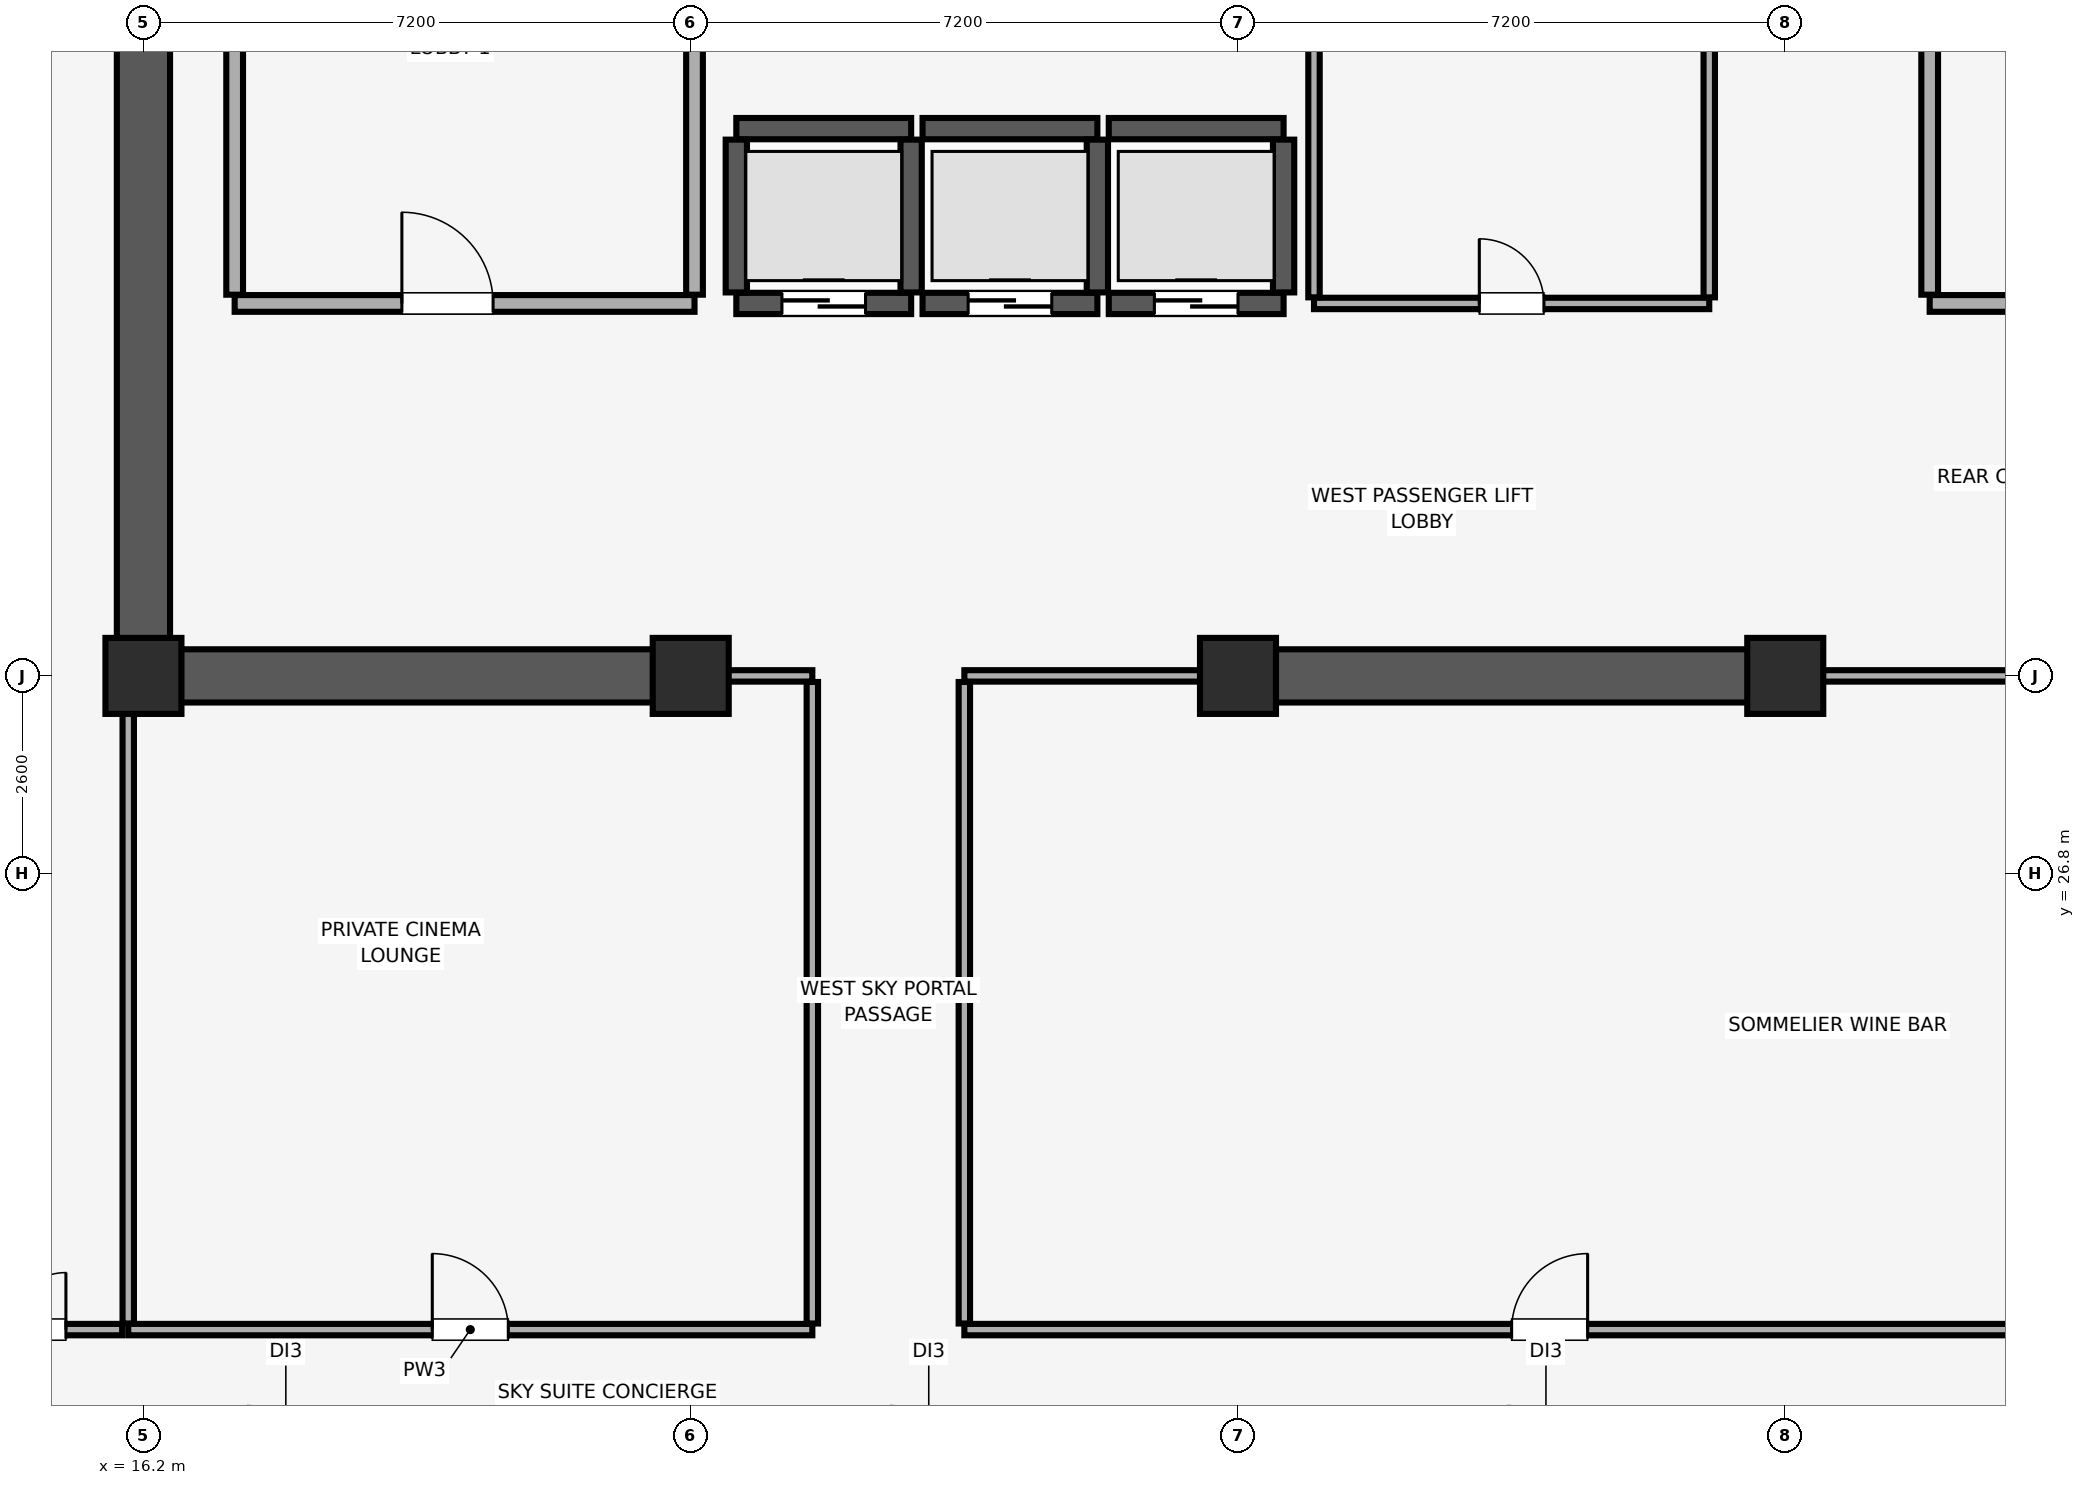
"""IFC4 building model, lengths in metres.
Left out: names, types, materials, properties, quantities, classifications, styles, units other than length and angle.
Written with IfcOpenShell. Run it as: python <this file> out.ifc"""

import sys

from ifc_helpers import new_model, si_unit, direction, frame, frame_2d, origin, origin_2d, place, context, subcontext, project, spatial, rectangle, extrude, element, fill, save


model = new_model("IFC4")
c1 = context("Model", 3, precision=1e-05, world=origin(), true_north=direction((0.0, 1.0)))
c2 = subcontext(c1, "Body", "Model", "MODEL_VIEW")
j1 = project(units=[si_unit("LENGTHUNIT", "METRE"), si_unit("PLANEANGLEUNIT", "RADIAN")], contexts=[c1])
p1 = place(None, origin())
s1 = spatial("IfcSite", under=j1, at=p1, CompositionType="ELEMENT")
p2 = place(p1, origin())
s2 = spatial("IfcBuilding", under=s1, at=p2, CompositionType="ELEMENT")
p3 = place(p2, frame((0.0, 0.0, 285.9)))
s3 = spatial("IfcBuildingStorey", under=s2, at=p3, CompositionType="ELEMENT", Elevation=285.9)
for number, where, z_axis, x_axis in (
    (1, (16.2, 29.4, 0.0), (0.0, 0.0, 1.0), (1.0, 0.0, 0.0)),
    (2, (23.4, 29.4, 0.0), (0.0, 0.0, 1.0), (1.0, 0.0, 0.0)),
    (3, (30.6, 29.4, 0.0), (0.0, 0.0, 1.0), (1.0, 0.0, 0.0)),
    (4, (37.8, 29.4, 0.0), (0.0, 0.0, 1.0), (1.0, 0.0, 0.0)),
):
    element("IfcColumn", number, at=place(p3, frame(where, z_axis=z_axis, x_axis=x_axis)), inside=s3, PredefinedType="COLUMN", context=c2, shape_type="SweptSolid", body=[
        extrude(rectangle(XDim=1.0, YDim=1.0, at=origin_2d()), origin(), (0.0, 0.0, 1.0), 4.1),
    ])
p4 = place(p3, frame((16.2, 29.4, 0.0), z_axis=(0.0, 0.0, 1.0), x_axis=(0.0, 1.0, 0.0)))
e5 = element("IfcWall", 5, at=p4, inside=s3, PredefinedType="SHEAR", context=c2, shape_type="SweptSolid", body=[
    extrude(rectangle(XDim=19.2, YDim=0.7, at=frame_2d((9.6, 0.0))), origin(), (0.0, 0.0, 1.0), 4.1),
])
p5 = place(p3, frame((16.555, 29.4, 0.0), z_axis=(0.0, 0.0, 1.0), x_axis=(1.0, 0.0, 0.0)))
e6 = element("IfcWall", 6, at=p5, inside=s3, PredefinedType="SHEAR", context=c2, shape_type="SweptSolid", body=[
    extrude(rectangle(XDim=7.045, YDim=0.7, at=frame_2d((3.522, 0.0))), origin(), (0.0, 0.0, 1.0), 4.1),
])
p6 = place(p3, frame((30.4, 29.4, 0.0), z_axis=(0.0, 0.0, 1.0), x_axis=(1.0, 0.0, 0.0)))
e7 = element("IfcWall", 7, at=p6, inside=s3, PredefinedType="SHEAR", context=c2, shape_type="SweptSolid", body=[
    extrude(rectangle(XDim=7.6, YDim=0.7, at=frame_2d((3.8, 0.0))), origin(), (0.0, 0.0, 1.0), 4.1),
])
p7 = place(p3, frame((24.0, 34.3, 0.0), z_axis=(0.0, 0.0, 1.0), x_axis=(1.0, 0.0, 0.0)))
e8 = element("IfcWall", 8, at=p7, inside=s3, PredefinedType="SHEAR", context=c2, shape_type="SweptSolid", body=[
    extrude(rectangle(XDim=2.3, YDim=0.28, at=frame_2d((1.15, 0.0))), origin(), (0.0, 0.0, 1.0), 4.1),
])
p8 = place(p7, frame((0.6, 0.0, 0.0)))
e9 = element("IfcOpeningElement", 9, at=p8, cuts=e8, PredefinedType="OPENING", context=c2, shape_type="SweptSolid", body=[
    extrude(rectangle(XDim=1.1, YDim=2.2, at=frame_2d((0.55, 1.1))), frame((0.0, 0.15, 0.0), z_axis=(0.0, -1.0, 0.0), x_axis=(1.0, 0.0, 0.0)), (0.0, 0.0, 1.0), 0.3),
])
p9 = place(p3, frame((24.0, 36.6, 0.0), z_axis=(0.0, 0.0, 1.0), x_axis=(1.0, 0.0, 0.0)))
e10 = element("IfcWall", 10, at=p9, inside=s3, PredefinedType="SHEAR", context=c2, shape_type="SweptSolid", body=[
    extrude(rectangle(XDim=2.3, YDim=0.28, at=frame_2d((1.15, 0.0))), origin(), (0.0, 0.0, 1.0), 4.1),
])
for number, where, z_axis, x_axis in (
    (11, (24.0, 34.445, 0.0), (0.0, 0.0, 1.0), (0.0, 1.0, 0.0)),
    (12, (26.3, 34.445, 0.0), (0.0, 0.0, 1.0), (0.0, 1.0, 0.0)),
):
    element("IfcWall", number, at=place(p3, frame(where, z_axis=z_axis, x_axis=x_axis)), inside=s3, PredefinedType="SHEAR", context=c2, shape_type="SweptSolid", body=[
        extrude(rectangle(XDim=2.01, YDim=0.28, at=frame_2d((1.005, 0.0))), origin(), (0.0, 0.0, 1.0), 4.1),
    ])
p10 = place(p3, frame((26.45, 34.3, 0.0), z_axis=(0.0, 0.0, 1.0), x_axis=(1.0, 0.0, 0.0)))
e13 = element("IfcWall", 13, at=p10, inside=s3, PredefinedType="SHEAR", context=c2, shape_type="SweptSolid", body=[
    extrude(rectangle(XDim=2.3, YDim=0.28, at=frame_2d((1.15, 0.0))), origin(), (0.0, 0.0, 1.0), 4.1),
])
p11 = place(p10, frame((0.6, 0.0, 0.0)))
e14 = element("IfcOpeningElement", 14, at=p11, cuts=e13, PredefinedType="OPENING", context=c2, shape_type="SweptSolid", body=[
    extrude(rectangle(XDim=1.1, YDim=2.2, at=frame_2d((0.55, 1.1))), frame((0.0, 0.15, 0.0), z_axis=(0.0, -1.0, 0.0), x_axis=(1.0, 0.0, 0.0)), (0.0, 0.0, 1.0), 0.3),
])
p12 = place(p3, frame((26.45, 36.6, 0.0), z_axis=(0.0, 0.0, 1.0), x_axis=(1.0, 0.0, 0.0)))
e15 = element("IfcWall", 15, at=p12, inside=s3, PredefinedType="SHEAR", context=c2, shape_type="SweptSolid", body=[
    extrude(rectangle(XDim=2.3, YDim=0.28, at=frame_2d((1.15, 0.0))), origin(), (0.0, 0.0, 1.0), 4.1),
])
p13 = place(p3, frame((28.75, 34.445, 0.0), z_axis=(0.0, 0.0, 1.0), x_axis=(0.0, 1.0, 0.0)))
e16 = element("IfcWall", 16, at=p13, inside=s3, PredefinedType="SHEAR", context=c2, shape_type="SweptSolid", body=[
    extrude(rectangle(XDim=2.01, YDim=0.28, at=frame_2d((1.005, 0.0))), origin(), (0.0, 0.0, 1.0), 4.1),
])
p14 = place(p3, frame((28.9, 34.3, 0.0), z_axis=(0.0, 0.0, 1.0), x_axis=(1.0, 0.0, 0.0)))
e17 = element("IfcWall", 17, at=p14, inside=s3, PredefinedType="SHEAR", context=c2, shape_type="SweptSolid", body=[
    extrude(rectangle(XDim=2.3, YDim=0.28, at=frame_2d((1.15, 0.0))), origin(), (0.0, 0.0, 1.0), 4.1),
])
p15 = place(p14, frame((0.6, 0.0, 0.0)))
e18 = element("IfcOpeningElement", 18, at=p15, cuts=e17, PredefinedType="OPENING", context=c2, shape_type="SweptSolid", body=[
    extrude(rectangle(XDim=1.1, YDim=2.2, at=frame_2d((0.55, 1.1))), frame((0.0, 0.15, 0.0), z_axis=(0.0, -1.0, 0.0), x_axis=(1.0, 0.0, 0.0)), (0.0, 0.0, 1.0), 0.3),
])
p16 = place(p3, frame((28.9, 36.6, 0.0), z_axis=(0.0, 0.0, 1.0), x_axis=(1.0, 0.0, 0.0)))
e19 = element("IfcWall", 19, at=p16, inside=s3, PredefinedType="SHEAR", context=c2, shape_type="SweptSolid", body=[
    extrude(rectangle(XDim=2.3, YDim=0.28, at=frame_2d((1.15, 0.0))), origin(), (0.0, 0.0, 1.0), 4.1),
])
p17 = place(p3, frame((31.2, 34.445, 0.0), z_axis=(0.0, 0.0, 1.0), x_axis=(0.0, 1.0, 0.0)))
e20 = element("IfcWall", 20, at=p17, inside=s3, PredefinedType="SHEAR", context=c2, shape_type="SweptSolid", body=[
    extrude(rectangle(XDim=2.01, YDim=0.28, at=frame_2d((1.005, 0.0))), origin(), (0.0, 0.0, 1.0), 4.1),
])
p18 = place(p3, frame((17.4, 34.3, 0.0), z_axis=(0.0, 0.0, 1.0), x_axis=(1.0, 0.0, 0.0)))
e21 = element("IfcWall", 21, at=p18, inside=s3, PredefinedType="PARTITIONING", context=c2, shape_type="SweptSolid", body=[
    extrude(rectangle(XDim=6.05, YDim=0.22, at=frame_2d((3.025, 0.0))), origin(), (0.0, 0.0, 1.0), 4.1),
])
p19 = place(p18, frame((2.2, 0.0, 0.0)))
e22 = element("IfcOpeningElement", 22, at=p19, cuts=e21, PredefinedType="OPENING", context=c2, shape_type="SweptSolid", body=[
    extrude(rectangle(XDim=1.2, YDim=2.15, at=frame_2d((0.6, 1.075))), frame((0.0, 0.12, 0.0), z_axis=(0.0, -1.0, 0.0), x_axis=(1.0, 0.0, 0.0)), (0.0, 0.0, 1.0), 0.24),
])
p20 = place(p3, frame((17.4, 34.415, 0.0), z_axis=(0.0, 0.0, 1.0), x_axis=(0.0, 1.0, 0.0)))
e23 = element("IfcWall", 23, at=p20, inside=s3, PredefinedType="PARTITIONING", context=c2, shape_type="SweptSolid", body=[
    extrude(rectangle(XDim=5.43, YDim=0.22, at=frame_2d((2.715, 0.0))), origin(), (0.0, 0.0, 1.0), 4.1),
])
p21 = place(p3, frame((23.45, 34.415, 0.0), z_axis=(0.0, 0.0, 1.0), x_axis=(0.0, 1.0, 0.0)))
e24 = element("IfcWall", 24, at=p21, inside=s3, PredefinedType="PARTITIONING", context=c2, shape_type="SweptSolid", body=[
    extrude(rectangle(XDim=5.64, YDim=0.22, at=frame_2d((2.82, 0.0))), origin(), (0.0, 0.0, 1.0), 4.1),
])
p22 = place(p3, frame((39.7, 34.3, 0.0), z_axis=(0.0, 0.0, 1.0), x_axis=(1.0, 0.0, 0.0)))
e25 = element("IfcWall", 25, at=p22, inside=s3, PredefinedType="PARTITIONING", context=c2, shape_type="SweptSolid", body=[
    extrude(rectangle(XDim=4.6, YDim=0.22, at=frame_2d((2.3, 0.0))), origin(), (0.0, 0.0, 1.0), 4.1),
])
p23 = place(p22, frame((1.7, 0.0, 0.0)))
e26 = element("IfcOpeningElement", 26, at=p23, cuts=e25, PredefinedType="OPENING", context=c2, shape_type="SweptSolid", body=[
    extrude(rectangle(XDim=1.2, YDim=2.15, at=frame_2d((0.6, 1.075))), frame((0.0, 0.12, 0.0), z_axis=(0.0, -1.0, 0.0), x_axis=(1.0, 0.0, 0.0)), (0.0, 0.0, 1.0), 0.24),
])
p24 = place(p3, frame((39.7, 34.415, 0.0), z_axis=(0.0, 0.0, 1.0), x_axis=(0.0, 1.0, 0.0)))
e27 = element("IfcWall", 27, at=p24, inside=s3, PredefinedType="PARTITIONING", context=c2, shape_type="SweptSolid", body=[
    extrude(rectangle(XDim=5.785, YDim=0.22, at=frame_2d((2.893, 0.0))), origin(), (0.0, 0.0, 1.0), 4.1),
])
p25 = place(p3, frame((31.6, 34.3, 0.0), z_axis=(0.0, 0.0, 1.0), x_axis=(1.0, 0.0, 0.0)))
e28 = element("IfcWall", 28, at=p25, inside=s3, PredefinedType="PARTITIONING", context=c2, shape_type="SweptSolid", body=[
    extrude(rectangle(XDim=5.2, YDim=0.15, at=frame_2d((2.6, 0.0))), origin(), (0.0, 0.0, 1.0), 4.1),
])
p26 = place(p25, frame((2.175, 0.0, 0.0)))
e29 = element("IfcOpeningElement", 29, at=p26, cuts=e28, PredefinedType="OPENING", context=c2, shape_type="SweptSolid", body=[
    extrude(rectangle(XDim=0.85, YDim=2.1, at=frame_2d((0.425, 1.05))), frame((0.0, 0.085, 0.0), z_axis=(0.0, -1.0, 0.0), x_axis=(1.0, 0.0, 0.0)), (0.0, 0.0, 1.0), 0.17),
])
for number, where, z_axis, x_axis in (
    (30, (31.6, 34.38, 0.0), (0.0, 0.0, 1.0), (0.0, 1.0, 0.0)),
    (31, (36.8, 34.38, 0.0), (0.0, 0.0, 1.0), (0.0, 1.0, 0.0)),
):
    element("IfcWall", number, at=place(p3, frame(where, z_axis=z_axis, x_axis=x_axis)), inside=s3, PredefinedType="PARTITIONING", context=c2, shape_type="SweptSolid", body=[
        extrude(rectangle(XDim=4.94, YDim=0.15, at=frame_2d((2.47, 0.0))), origin(), (0.0, 0.0, 1.0), 4.1),
    ])
p27 = place(p3, frame((16.0, 20.8, 0.0), z_axis=(0.0, 0.0, 1.0), x_axis=(1.0, 0.0, 0.0)))
e32 = element("IfcWall", 32, at=p27, inside=s3, PredefinedType="PARTITIONING", context=c2, shape_type="SweptSolid", body=[
    extrude(rectangle(XDim=9.0, YDim=0.15, at=frame_2d((4.5, 0.0))), origin(), (0.0, 0.0, 1.0), 4.1),
])
p28 = place(p27, frame((4.0, 0.0, 0.0)))
e33 = element("IfcOpeningElement", 33, at=p28, cuts=e32, PredefinedType="OPENING", context=c2, shape_type="SweptSolid", body=[
    extrude(rectangle(XDim=1.0, YDim=2.15, at=frame_2d((0.5, 1.075))), frame((0.0, 0.085, 0.0), z_axis=(0.0, -1.0, 0.0), x_axis=(1.0, 0.0, 0.0)), (0.0, 0.0, 1.0), 0.17),
])
p29 = place(p3, frame((23.61, 29.4, 0.0), z_axis=(0.0, 0.0, 1.0), x_axis=(1.0, 0.0, 0.0)))
e34 = element("IfcWall", 34, at=p29, inside=s3, PredefinedType="PARTITIONING", context=c2, shape_type="SweptSolid", body=[
    extrude(rectangle(XDim=1.39, YDim=0.15, at=frame_2d((0.695, 0.0))), origin(), (0.0, 0.0, 1.0), 3.0),
])
p30 = place(p3, frame((16.0, 20.88, 0.0), z_axis=(0.0, 0.0, 1.0), x_axis=(0.0, 1.0, 0.0)))
e35 = element("IfcWall", 35, at=p30, inside=s3, PredefinedType="PARTITIONING", context=c2, shape_type="SweptSolid", body=[
    extrude(rectangle(XDim=8.51, YDim=0.15, at=frame_2d((4.255, 0.0))), origin(), (0.0, 0.0, 1.0), 3.74),
])
p31 = place(p3, frame((25.0, 20.88, 0.0), z_axis=(0.0, 0.0, 1.0), x_axis=(0.0, 1.0, 0.0)))
e36 = element("IfcWall", 36, at=p31, inside=s3, PredefinedType="PARTITIONING", context=c2, shape_type="SweptSolid", body=[
    extrude(rectangle(XDim=8.44, YDim=0.15, at=frame_2d((4.22, 0.0))), origin(), (0.0, 0.0, 1.0), 4.1),
])
p32 = place(p3, frame((27.0, 20.8, 0.0), z_axis=(0.0, 0.0, 1.0), x_axis=(1.0, 0.0, 0.0)))
e37 = element("IfcWall", 37, at=p32, inside=s3, PredefinedType="PARTITIONING", context=c2, shape_type="SweptSolid", body=[
    extrude(rectangle(XDim=15.4, YDim=0.15, at=frame_2d((7.7, 0.0))), origin(), (0.0, 0.0, 1.0), 4.1),
])
p33 = place(p32, frame((7.2, 0.0, 0.0)))
e38 = element("IfcOpeningElement", 38, at=p33, cuts=e37, PredefinedType="OPENING", context=c2, shape_type="SweptSolid", body=[
    extrude(rectangle(XDim=1.0, YDim=2.15, at=frame_2d((0.5, 1.075))), frame((0.0, 0.085, 0.0), z_axis=(0.0, -1.0, 0.0), x_axis=(1.0, 0.0, 0.0)), (0.0, 0.0, 1.0), 0.17),
])
p34 = place(p3, frame((27.0, 29.4, 0.0), z_axis=(0.0, 0.0, 1.0), x_axis=(1.0, 0.0, 0.0)))
e39 = element("IfcWall", 39, at=p34, inside=s3, PredefinedType="PARTITIONING", context=c2, shape_type="SweptSolid", body=[
    extrude(rectangle(XDim=3.39, YDim=0.15, at=frame_2d((1.695, 0.0))), origin(), (0.0, 0.0, 1.0), 3.0),
])
p35 = place(p3, frame((38.01, 29.4, 0.0), z_axis=(0.0, 0.0, 1.0), x_axis=(1.0, 0.0, 0.0)))
e40 = element("IfcWall", 40, at=p35, inside=s3, PredefinedType="PARTITIONING", context=c2, shape_type="SweptSolid", body=[
    extrude(rectangle(XDim=4.39, YDim=0.15, at=frame_2d((2.195, 0.0))), origin(), (0.0, 0.0, 1.0), 3.0),
])
p36 = place(p3, frame((27.0, 20.88, 0.0), z_axis=(0.0, 0.0, 1.0), x_axis=(0.0, 1.0, 0.0)))
e41 = element("IfcWall", 41, at=p36, inside=s3, PredefinedType="PARTITIONING", context=c2, shape_type="SweptSolid", body=[
    extrude(rectangle(XDim=8.44, YDim=0.15, at=frame_2d((4.22, 0.0))), origin(), (0.0, 0.0, 1.0), 3.74),
])
p37 = place(p3, frame((9.15, 20.8, 0.0), z_axis=(0.0, 0.0, 1.0), x_axis=(1.0, 0.0, 0.0)))
e42 = element("IfcWall", 42, at=p37, inside=s3, PredefinedType="PARTITIONING", context=c2, shape_type="SweptSolid", body=[
    extrude(rectangle(XDim=6.77, YDim=0.15, at=frame_2d((3.385, 0.0))), origin(), (0.0, 0.0, 1.0), 4.1),
])
p38 = place(p37, frame((4.53, 0.0, 0.0)))
e43 = element("IfcOpeningElement", 43, at=p38, cuts=e42, PredefinedType="OPENING", context=c2, shape_type="SweptSolid", body=[
    extrude(rectangle(XDim=1.5, YDim=2.25, at=frame_2d((0.75, 1.125))), frame((0.0, 0.085, 0.0), z_axis=(0.0, -1.0, 0.0), x_axis=(1.0, 0.0, 0.0)), (0.0, 0.0, 1.0), 0.17),
])
p39 = place(p8, origin())
e44 = element("IfcDoor", 44, at=p39, inside=s3, OperationType="DOUBLE_DOOR_SLIDING", PredefinedType="DOOR", context=c2, shape_type="SweptSolid", body=[
    extrude(rectangle(XDim=1.1, YDim=2.2, at=frame_2d((0.55, 1.1))), frame((0.0, 0.025, 0.0), z_axis=(0.0, -1.0, 0.0), x_axis=(1.0, 0.0, 0.0)), (0.0, 0.0, 1.0), 0.05),
])
fill(e9, e44)
p40 = place(p11, origin())
e45 = element("IfcDoor", 45, at=p40, inside=s3, OperationType="DOUBLE_DOOR_SLIDING", PredefinedType="DOOR", context=c2, shape_type="SweptSolid", body=[
    extrude(rectangle(XDim=1.1, YDim=2.2, at=frame_2d((0.55, 1.1))), frame((0.0, 0.025, 0.0), z_axis=(0.0, -1.0, 0.0), x_axis=(1.0, 0.0, 0.0)), (0.0, 0.0, 1.0), 0.05),
])
fill(e14, e45)
p41 = place(p15, origin())
e46 = element("IfcDoor", 46, at=p41, inside=s3, OperationType="DOUBLE_DOOR_SLIDING", PredefinedType="DOOR", context=c2, shape_type="SweptSolid", body=[
    extrude(rectangle(XDim=1.1, YDim=2.2, at=frame_2d((0.55, 1.1))), frame((0.0, 0.025, 0.0), z_axis=(0.0, -1.0, 0.0), x_axis=(1.0, 0.0, 0.0)), (0.0, 0.0, 1.0), 0.05),
])
fill(e18, e46)
p42 = place(p19, origin())
e47 = element("IfcDoor", 47, at=p42, inside=s3, OperationType="SINGLE_SWING_LEFT", PredefinedType="DOOR", context=c2, shape_type="SweptSolid", body=[
    extrude(rectangle(XDim=1.2, YDim=2.15, at=frame_2d((0.6, 1.075))), frame((0.0, 0.025, 0.0), z_axis=(0.0, -1.0, 0.0), x_axis=(1.0, 0.0, 0.0)), (0.0, 0.0, 1.0), 0.05),
])
fill(e22, e47)
p43 = place(p26, origin())
e48 = element("IfcDoor", 48, at=p43, inside=s3, OperationType="SINGLE_SWING_LEFT", PredefinedType="DOOR", context=c2, shape_type="SweptSolid", body=[
    extrude(rectangle(XDim=0.85, YDim=2.1, at=frame_2d((0.425, 1.05))), frame((0.0, 0.025, 0.0), z_axis=(0.0, -1.0, 0.0), x_axis=(1.0, 0.0, 0.0)), (0.0, 0.0, 1.0), 0.05),
])
fill(e29, e48)
p44 = place(p28, origin())
e49 = element("IfcDoor", 49, at=p44, inside=s3, OperationType="SINGLE_SWING_LEFT", PredefinedType="DOOR", context=c2, shape_type="SweptSolid", body=[
    extrude(rectangle(XDim=1.0, YDim=2.15, at=frame_2d((0.5, 1.075))), frame((0.0, 0.025, 0.0), z_axis=(0.0, -1.0, 0.0), x_axis=(1.0, 0.0, 0.0)), (0.0, 0.0, 1.0), 0.05),
])
fill(e33, e49)
p45 = place(p33, origin())
e50 = element("IfcDoor", 50, at=p45, inside=s3, OperationType="SINGLE_SWING_RIGHT", PredefinedType="DOOR", context=c2, shape_type="SweptSolid", body=[
    extrude(rectangle(XDim=1.0, YDim=2.15, at=frame_2d((0.5, 1.075))), frame((0.0, 0.025, 0.0), z_axis=(0.0, -1.0, 0.0), x_axis=(1.0, 0.0, 0.0)), (0.0, 0.0, 1.0), 0.05),
])
fill(e38, e50)
p46 = place(p38, origin())
e51 = element("IfcDoor", 51, at=p46, inside=s3, OperationType="DOUBLE_DOOR_SINGLE_SWING", PredefinedType="DOOR", context=c2, shape_type="SweptSolid", body=[
    extrude(rectangle(XDim=1.5, YDim=2.25, at=frame_2d((0.75, 1.125))), frame((0.0, 0.025, 0.0), z_axis=(0.0, -1.0, 0.0), x_axis=(1.0, 0.0, 0.0)), (0.0, 0.0, 1.0), 0.05),
])
fill(e43, e51)
save(model, sys.argv[1])
